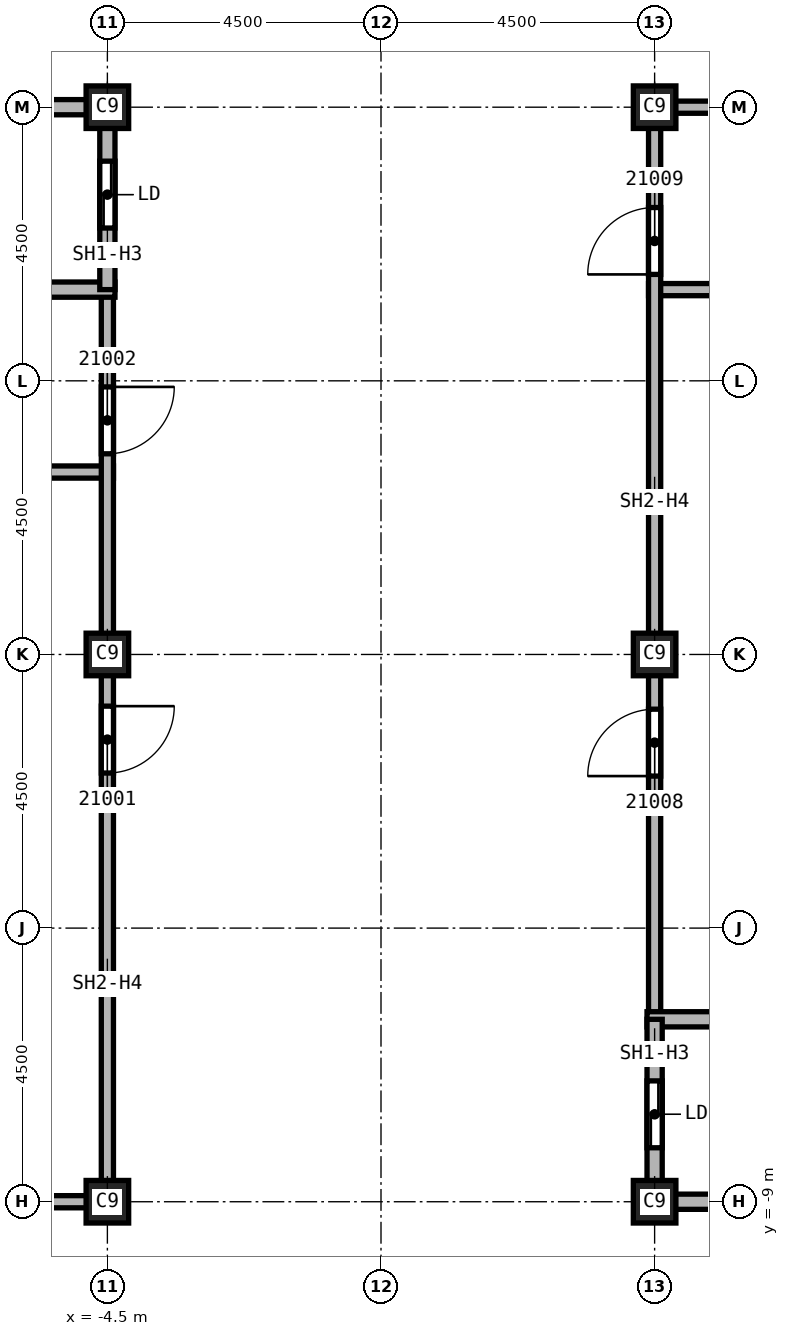
"""IFC4 building model, lengths in metres.
Left out: names, types, materials, properties, quantities, classifications, styles, units other than length and angle.
Written with IfcOpenShell. Run it as: python <this file> out.ifc"""

import sys

from ifc_helpers import new_model, si_unit, direction, frame, frame_2d, origin, origin_2d, place, context, subcontext, project, spatial, rectangle, extrude, element, fill, save


model = new_model("IFC4")
c1 = context("Model", 3, precision=1e-05, world=origin(), true_north=direction((0.0, 1.0)))
c2 = subcontext(c1, "Body", "Model", "MODEL_VIEW")
j1 = project(units=[si_unit("LENGTHUNIT", "METRE"), si_unit("PLANEANGLEUNIT", "RADIAN")], contexts=[c1])
p1 = place(None, origin())
s1 = spatial("IfcSite", under=j1, at=p1, CompositionType="ELEMENT")
p2 = place(p1, origin())
s2 = spatial("IfcBuilding", under=s1, at=p2, CompositionType="ELEMENT")
p3 = place(p2, frame((0.0, 0.0, 308.0)))
s3 = spatial("IfcBuildingStorey", under=s2, at=p3, CompositionType="ELEMENT", Elevation=308.0)
for number, where, z_axis, x_axis in (
    (1, (4.5, 0.0, 0.0), (0.0, 0.0, 1.0), (1.0, 0.0, 0.0)),
    (2, (4.5, 9.0, 0.0), (0.0, 0.0, 1.0), (1.0, 0.0, 0.0)),
    (3, (4.5, -9.0, 0.0), (0.0, 0.0, 1.0), (1.0, 0.0, 0.0)),
    (4, (-4.5, 0.0, 0.0), (0.0, 0.0, 1.0), (1.0, 0.0, 0.0)),
    (5, (-4.5, 9.0, 0.0), (0.0, 0.0, 1.0), (1.0, 0.0, 0.0)),
    (6, (-4.5, -9.0, 0.0), (0.0, 0.0, 1.0), (1.0, 0.0, 0.0)),
):
    element("IfcColumn", number, at=place(p3, frame(where, z_axis=z_axis, x_axis=x_axis)), inside=s3, PredefinedType="COLUMN", context=c2, shape_type="SweptSolid", body=[
        extrude(rectangle(XDim=0.7, YDim=0.7, at=origin_2d()), origin(), (0.0, 0.0, 1.0), 3.74),
    ])
p4 = place(p3, frame((-7.625, 3.0, 0.0), z_axis=(0.0, 0.0, 1.0), x_axis=(1.0, 0.0, 0.0)))
e7 = element("IfcWall", 7, at=p4, inside=s3, PredefinedType="SOLIDWALL", context=c2, shape_type="SweptSolid", body=[
    extrude(rectangle(XDim=3.225, YDim=0.2, at=frame_2d((1.613, 0.0))), origin(), (0.0, 0.0, 1.0), 3.74),
])
p5 = place(p3, frame((-4.5, -9.0, 0.0), z_axis=(0.0, 0.0, 1.0), x_axis=(-1.0, 0.0, 0.0)))
e8 = element("IfcWall", 8, at=p5, inside=s3, PredefinedType="SOLIDWALL", context=c2, shape_type="SweptSolid", body=[
    extrude(rectangle(XDim=3.0, YDim=0.2, at=frame_2d((1.5, 0.0))), origin(), (0.0, 0.0, 1.0), 3.062),
])
p6 = place(p3, frame((-4.5, 6.0, 0.0), z_axis=(0.0, 0.0, 1.0), x_axis=(0.0, -1.0, 0.0)))
e9 = element("IfcWall", 9, at=p6, inside=s3, PredefinedType="SOLIDWALL", context=c2, shape_type="SweptSolid", body=[
    extrude(rectangle(XDim=15.1, YDim=0.2, at=frame_2d((7.55, 0.0))), origin(), (0.0, 0.0, 1.0), 3.062),
])
p7 = place(p6, frame((6.85, 0.0, 0.0)))
e10 = element("IfcOpeningElement", 10, at=p7, cuts=e9, PredefinedType="OPENING", context=c2, shape_type="SweptSolid", body=[
    extrude(rectangle(XDim=1.1, YDim=2.1, at=frame_2d((0.55, 1.05))), frame((0.0, 0.1, 0.0), z_axis=(0.0, -1.0, 0.0), x_axis=(1.0, 0.0, 0.0)), (0.0, 0.0, 1.0), 0.2),
])
p8 = place(p6, frame((1.6, 0.0, 0.0)))
e11 = element("IfcOpeningElement", 11, at=p8, cuts=e9, PredefinedType="OPENING", context=c2, shape_type="SweptSolid", body=[
    extrude(rectangle(XDim=1.1, YDim=2.1, at=frame_2d((0.55, 1.05))), frame((0.0, 0.1, 0.0), z_axis=(0.0, -1.0, 0.0), x_axis=(1.0, 0.0, 0.0)), (0.0, 0.0, 1.0), 0.2),
])
p9 = place(p3, frame((4.4, 6.0, 0.0), z_axis=(0.0, 0.0, 1.0), x_axis=(1.0, 0.0, 0.0)))
e12 = element("IfcWall", 12, at=p9, inside=s3, PredefinedType="SOLIDWALL", context=c2, shape_type="SweptSolid", body=[
    extrude(rectangle(XDim=3.2, YDim=0.2, at=frame_2d((1.6, 0.0))), origin(), (0.0, 0.0, 1.0), 3.74),
])
p10 = place(p3, frame((4.5, -6.0, 0.0), z_axis=(0.0, 0.0, 1.0), x_axis=(0.0, 1.0, 0.0)))
e13 = element("IfcWall", 13, at=p10, inside=s3, PredefinedType="SOLIDWALL", context=c2, shape_type="SweptSolid", body=[
    extrude(rectangle(XDim=15.1, YDim=0.2, at=frame_2d((7.55, 0.0))), origin(), (0.0, 0.0, 1.0), 3.062),
])
p11 = place(p10, frame((4.0, 0.0, 0.0)))
e14 = element("IfcOpeningElement", 14, at=p11, cuts=e13, PredefinedType="OPENING", context=c2, shape_type="SweptSolid", body=[
    extrude(rectangle(XDim=1.1, YDim=2.1, at=frame_2d((0.55, 1.05))), frame((0.0, 0.1, 0.0), z_axis=(0.0, -1.0, 0.0), x_axis=(1.0, 0.0, 0.0)), (0.0, 0.0, 1.0), 0.2),
])
p12 = place(p10, frame((12.25, 0.0, 0.0)))
e15 = element("IfcOpeningElement", 15, at=p12, cuts=e13, PredefinedType="OPENING", context=c2, shape_type="SweptSolid", body=[
    extrude(rectangle(XDim=1.1, YDim=2.1, at=frame_2d((0.55, 1.05))), frame((0.0, 0.1, 0.0), z_axis=(0.0, -1.0, 0.0), x_axis=(1.0, 0.0, 0.0)), (0.0, 0.0, 1.0), 0.2),
])
p13 = place(p3, frame((4.5, 9.0, 0.0), z_axis=(0.0, 0.0, 1.0), x_axis=(1.0, 0.0, 0.0)))
e16 = element("IfcWall", 16, at=p13, inside=s3, PredefinedType="SOLIDWALL", context=c2, shape_type="SweptSolid", body=[
    extrude(rectangle(XDim=3.0, YDim=0.2, at=frame_2d((1.5, 0.0))), origin(), (0.0, 0.0, 1.0), 3.062),
])
p14 = place(p3, frame((-7.625, 6.0, 0.0), z_axis=(0.0, 0.0, 1.0), x_axis=(1.0, 0.0, 0.0)))
e17 = element("IfcWall", 17, at=p14, inside=s3, PredefinedType="SOLIDWALL", context=c2, shape_type="SweptSolid", body=[
    extrude(rectangle(XDim=3.25, YDim=0.25, at=frame_2d((1.625, 0.0))), origin(), (0.0, 0.0, 1.0), 3.74),
])
p15 = place(p3, frame((-7.5, 9.0, 0.0), z_axis=(0.0, 0.0, 1.0), x_axis=(1.0, 0.0, 0.0)))
e18 = element("IfcWall", 18, at=p15, inside=s3, PredefinedType="SOLIDWALL", context=c2, shape_type="SweptSolid", body=[
    extrude(rectangle(XDim=3.0, YDim=0.25, at=frame_2d((1.5, 0.0))), origin(), (0.0, 0.0, 1.0), 3.062),
])
p16 = place(p3, frame((-4.5, 9.125, 0.0), z_axis=(0.0, 0.0, 1.0), x_axis=(0.0, -1.0, 0.0)))
e19 = element("IfcWall", 19, at=p16, inside=s3, PredefinedType="SOLIDWALL", context=c2, shape_type="SweptSolid", body=[
    extrude(rectangle(XDim=3.125, YDim=0.25, at=frame_2d((1.562, 0.0))), origin(), (0.0, 0.0, 1.0), 3.062),
])
p17 = place(p16, frame((1.012, 0.0, 0.0)))
e20 = element("IfcOpeningElement", 20, at=p17, cuts=e19, PredefinedType="OPENING", context=c2, shape_type="SweptSolid", body=[
    extrude(rectangle(XDim=1.1, YDim=2.1, at=frame_2d((0.55, 1.05))), frame((0.0, 0.125, 0.0), z_axis=(0.0, -1.0, 0.0), x_axis=(1.0, 0.0, 0.0)), (0.0, 0.0, 1.0), 0.25),
])
p18 = place(p3, frame((4.375, -6.0, 0.0), z_axis=(0.0, 0.0, 1.0), x_axis=(1.0, 0.0, 0.0)))
e21 = element("IfcWall", 21, at=p18, inside=s3, PredefinedType="SOLIDWALL", context=c2, shape_type="SweptSolid", body=[
    extrude(rectangle(XDim=3.25, YDim=0.25, at=frame_2d((1.625, 0.0))), origin(), (0.0, 0.0, 1.0), 3.74),
])
p19 = place(p3, frame((4.5, -9.125, 0.0), z_axis=(0.0, 0.0, 1.0), x_axis=(0.0, 1.0, 0.0)))
e22 = element("IfcWall", 22, at=p19, inside=s3, PredefinedType="SOLIDWALL", context=c2, shape_type="SweptSolid", body=[
    extrude(rectangle(XDim=3.125, YDim=0.25, at=frame_2d((1.562, 0.0))), origin(), (0.0, 0.0, 1.0), 3.062),
])
p20 = place(p19, frame((1.012, 0.0, 0.0)))
e23 = element("IfcOpeningElement", 23, at=p20, cuts=e22, PredefinedType="OPENING", context=c2, shape_type="SweptSolid", body=[
    extrude(rectangle(XDim=1.1, YDim=2.1, at=frame_2d((0.55, 1.05))), frame((0.0, 0.125, 0.0), z_axis=(0.0, -1.0, 0.0), x_axis=(1.0, 0.0, 0.0)), (0.0, 0.0, 1.0), 0.25),
])
p21 = place(p3, frame((7.5, -9.0, 0.0), z_axis=(0.0, 0.0, 1.0), x_axis=(-1.0, 0.0, 0.0)))
e24 = element("IfcWall", 24, at=p21, inside=s3, PredefinedType="SOLIDWALL", context=c2, shape_type="SweptSolid", body=[
    extrude(rectangle(XDim=3.0, YDim=0.25, at=frame_2d((1.5, 0.0))), origin(), (0.0, 0.0, 1.0), 3.062),
])
p22 = place(p7, origin())
e25 = element("IfcDoor", 25, at=p22, inside=s3, OperationType="SINGLE_SWING_RIGHT", PredefinedType="DOOR", context=c2, shape_type="SweptSolid", body=[
    extrude(rectangle(XDim=1.1, YDim=2.1, at=frame_2d((0.55, 1.05))), frame((0.0, 0.025, 0.0), z_axis=(0.0, -1.0, 0.0), x_axis=(1.0, 0.0, 0.0)), (0.0, 0.0, 1.0), 0.05),
])
fill(e10, e25)
p23 = place(p8, origin())
e26 = element("IfcDoor", 26, at=p23, inside=s3, OperationType="SINGLE_SWING_LEFT", PredefinedType="DOOR", context=c2, shape_type="SweptSolid", body=[
    extrude(rectangle(XDim=1.1, YDim=2.1, at=frame_2d((0.55, 1.05))), frame((0.0, 0.025, 0.0), z_axis=(0.0, -1.0, 0.0), x_axis=(1.0, 0.0, 0.0)), (0.0, 0.0, 1.0), 0.05),
])
fill(e11, e26)
p24 = place(p11, origin())
e27 = element("IfcDoor", 27, at=p24, inside=s3, OperationType="SINGLE_SWING_LEFT", PredefinedType="DOOR", context=c2, shape_type="SweptSolid", body=[
    extrude(rectangle(XDim=1.1, YDim=2.1, at=frame_2d((0.55, 1.05))), frame((0.0, 0.025, 0.0), z_axis=(0.0, -1.0, 0.0), x_axis=(1.0, 0.0, 0.0)), (0.0, 0.0, 1.0), 0.05),
])
fill(e14, e27)
p25 = place(p12, origin())
e28 = element("IfcDoor", 28, at=p25, inside=s3, OperationType="SINGLE_SWING_RIGHT", PredefinedType="DOOR", context=c2, shape_type="SweptSolid", body=[
    extrude(rectangle(XDim=1.1, YDim=2.1, at=frame_2d((0.55, 1.05))), frame((0.0, 0.025, 0.0), z_axis=(0.0, -1.0, 0.0), x_axis=(1.0, 0.0, 0.0)), (0.0, 0.0, 1.0), 0.05),
])
fill(e15, e28)
p26 = place(p17, origin())
e29 = element("IfcDoor", 29, at=p26, inside=s3, OperationType="SLIDING_TO_LEFT", PredefinedType="DOOR", context=c2, shape_type="SweptSolid", body=[
    extrude(rectangle(XDim=1.1, YDim=2.1, at=frame_2d((0.55, 1.05))), frame((0.0, 0.025, 0.0), z_axis=(0.0, -1.0, 0.0), x_axis=(1.0, 0.0, 0.0)), (0.0, 0.0, 1.0), 0.05),
])
fill(e20, e29)
p27 = place(p20, origin())
e30 = element("IfcDoor", 30, at=p27, inside=s3, OperationType="SLIDING_TO_LEFT", PredefinedType="DOOR", context=c2, shape_type="SweptSolid", body=[
    extrude(rectangle(XDim=1.1, YDim=2.1, at=frame_2d((0.55, 1.05))), frame((0.0, 0.025, 0.0), z_axis=(0.0, -1.0, 0.0), x_axis=(1.0, 0.0, 0.0)), (0.0, 0.0, 1.0), 0.05),
])
fill(e23, e30)
save(model, sys.argv[1])
